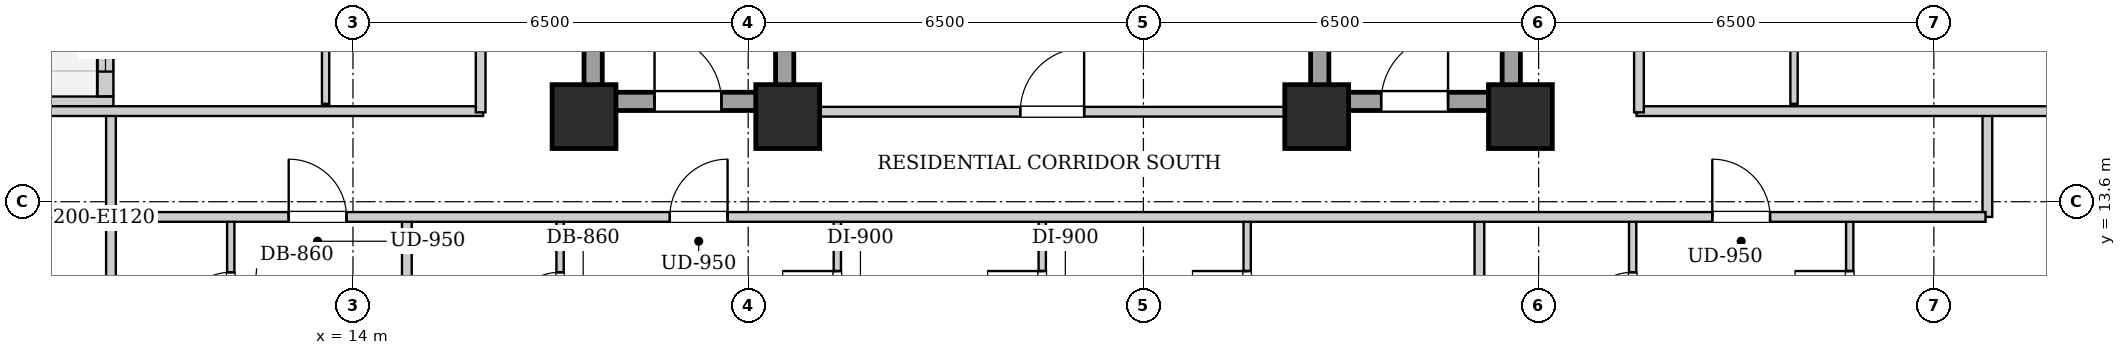
"""IFC4 building model, lengths in metres.
Left out: names, types, materials, properties, quantities, classifications, styles, units other than length and angle.
Written with IfcOpenShell. Run it as: python <this file> out.ifc"""

import sys

from ifc_helpers import new_model, si_unit, direction, frame, frame_2d, origin, origin_2d, place, context, subcontext, project, spatial, rectangle, extrude, element, fill, save


model = new_model("IFC4")
c1 = context("Model", 3, precision=1e-05, world=origin(), true_north=direction((0.0, 1.0)))
c2 = subcontext(c1, "Body", "Model", "MODEL_VIEW")
j1 = project(units=[si_unit("LENGTHUNIT", "METRE"), si_unit("PLANEANGLEUNIT", "RADIAN")], contexts=[c1])
p1 = place(None, origin())
s1 = spatial("IfcSite", under=j1, at=p1, CompositionType="ELEMENT")
p2 = place(p1, origin())
s2 = spatial("IfcBuilding", under=s1, at=p2, CompositionType="ELEMENT")
p3 = place(p2, frame((0.0, 0.0, 78.3)))
s3 = spatial("IfcBuildingStorey", under=s2, at=p3, CompositionType="ELEMENT", Elevation=78.3)
for number, where, z_axis, x_axis in (
    (1, (17.8, 15.0, 0.0), (0.0, 0.0, 1.0), (1.0, 0.0, 0.0)),
    (2, (21.15, 15.0, 0.0), (0.0, 0.0, 1.0), (1.0, 0.0, 0.0)),
    (3, (29.85, 15.0, 0.0), (0.0, 0.0, 1.0), (1.0, 0.0, 0.0)),
    (4, (33.2, 15.0, 0.0), (0.0, 0.0, 1.0), (1.0, 0.0, 0.0)),
):
    element("IfcColumn", number, at=place(p3, frame(where, z_axis=z_axis, x_axis=x_axis)), inside=s3, PredefinedType="COLUMN", context=c2, shape_type="SweptSolid", body=[
        extrude(rectangle(XDim=1.05, YDim=1.05, at=origin_2d()), origin(), (0.0, 0.0, 1.0), 3.2),
    ])
p4 = place(p3, frame((7.66, 15.2, 0.0), z_axis=(0.0, 0.0, 1.0), x_axis=(1.0, 0.0, 0.0)))
e5 = element("IfcWall", 5, at=p4, inside=s3, PredefinedType="SOLIDWALL", context=c2, shape_type="SweptSolid", body=[
    extrude(rectangle(XDim=2.4, YDim=0.26, at=frame_2d((1.2, 0.0))), origin(), (0.0, 0.0, 1.0), 2.94),
])
p5 = place(p3, frame((9.93, 15.334, 0.0), z_axis=(0.0, 0.0, 1.0), x_axis=(0.0, 1.0, 0.0)))
e6 = element("IfcWall", 6, at=p5, inside=s3, PredefinedType="SOLIDWALL", context=c2, shape_type="SweptSolid", body=[
    extrude(rectangle(XDim=3.932, YDim=0.26, at=frame_2d((1.966, 0.0))), origin(), (0.0, 0.0, 1.0), 2.94),
])
p6 = place(p5, frame((1.416, 0.0, 0.0)))
e7 = element("IfcOpeningElement", 7, at=p6, cuts=e6, PredefinedType="OPENING", context=c2, shape_type="SweptSolid", body=[
    extrude(rectangle(XDim=1.1, YDim=2.0, at=frame_2d((0.55, 1.0))), frame((0.0, 0.14, 0.0), z_axis=(0.0, -1.0, 0.0), x_axis=(1.0, 0.0, 0.0)), (0.0, 0.0, 1.0), 0.28),
])
p7 = place(p5, frame((0.406, 0.0, 0.55)))
e8 = element("IfcOpeningElement", 8, at=p7, cuts=e6, PredefinedType="OPENING", context=c2, shape_type="SweptSolid", body=[
    extrude(rectangle(XDim=0.85, YDim=1.2, at=frame_2d((0.425, 0.6))), frame((0.0, 0.14, 0.0), z_axis=(0.0, -1.0, 0.0), x_axis=(1.0, 0.0, 0.0)), (0.0, 0.0, 1.0), 0.28),
])
for number, where, z_axis, x_axis in (
    (9, (17.95, 15.1, 0.0), (0.0, 0.0, 1.0), (0.0, 1.0, 0.0)),
    (10, (21.1, 15.1, 0.0), (0.0, 0.0, 1.0), (0.0, 1.0, 0.0)),
):
    element("IfcWall", number, at=place(p3, frame(where, z_axis=z_axis, x_axis=x_axis)), inside=s3, PredefinedType="SHEAR", context=c2, shape_type="SweptSolid", body=[
        extrude(rectangle(XDim=9.0, YDim=0.3, at=frame_2d((4.5, 0.0))), origin(), (0.0, 0.0, 1.0), 2.94),
    ])
p8 = place(p3, frame((18.1, 15.25, 0.0), z_axis=(0.0, 0.0, 1.0), x_axis=(1.0, 0.0, 0.0)))
e11 = element("IfcWall", 11, at=p8, inside=s3, PredefinedType="SHEAR", context=c2, shape_type="SweptSolid", body=[
    extrude(rectangle(XDim=2.85, YDim=0.3, at=frame_2d((1.425, 0.0))), origin(), (0.0, 0.0, 1.0), 2.94),
])
p9 = place(p8, frame((0.86, 0.0, 0.0)))
e12 = element("IfcOpeningElement", 12, at=p9, cuts=e11, PredefinedType="OPENING", context=c2, shape_type="SweptSolid", body=[
    extrude(rectangle(XDim=1.1, YDim=2.05, at=frame_2d((0.55, 1.025))), frame((0.0, 0.16, 0.0), z_axis=(0.0, -1.0, 0.0), x_axis=(1.0, 0.0, 0.0)), (0.0, 0.0, 1.0), 0.32),
])
for number, where, z_axis, x_axis in (
    (13, (29.9, 15.1, 0.0), (0.0, 0.0, 1.0), (0.0, 1.0, 0.0)),
    (14, (33.05, 15.1, 0.0), (0.0, 0.0, 1.0), (0.0, 1.0, 0.0)),
):
    element("IfcWall", number, at=place(p3, frame(where, z_axis=z_axis, x_axis=x_axis)), inside=s3, PredefinedType="SHEAR", context=c2, shape_type="SweptSolid", body=[
        extrude(rectangle(XDim=9.0, YDim=0.3, at=frame_2d((4.5, 0.0))), origin(), (0.0, 0.0, 1.0), 2.94),
    ])
p10 = place(p3, frame((30.05, 15.25, 0.0), z_axis=(0.0, 0.0, 1.0), x_axis=(1.0, 0.0, 0.0)))
e15 = element("IfcWall", 15, at=p10, inside=s3, PredefinedType="SHEAR", context=c2, shape_type="SweptSolid", body=[
    extrude(rectangle(XDim=2.85, YDim=0.3, at=frame_2d((1.425, 0.0))), origin(), (0.0, 0.0, 1.0), 2.94),
])
p11 = place(p10, frame((0.86, 0.0, 0.0)))
e16 = element("IfcOpeningElement", 16, at=p11, cuts=e15, PredefinedType="OPENING", context=c2, shape_type="SweptSolid", body=[
    extrude(rectangle(XDim=1.1, YDim=2.05, at=frame_2d((0.55, 1.025))), frame((0.0, 0.16, 0.0), z_axis=(0.0, -1.0, 0.0), x_axis=(1.0, 0.0, 0.0)), (0.0, 0.0, 1.0), 0.32),
])
p12 = place(p3, frame((21.25, 15.08, 0.0), z_axis=(0.0, 0.0, 1.0), x_axis=(1.0, 0.0, 0.0)))
e17 = element("IfcWall", 17, at=p12, inside=s3, PredefinedType="PARTITIONING", context=c2, shape_type="SweptSolid", body=[
    extrude(rectangle(XDim=8.5, YDim=0.16, at=frame_2d((4.25, 0.0))), origin(), (0.0, 0.0, 1.0), 2.309),
])
p13 = place(p12, frame((3.725, 0.0, 0.0)))
e18 = element("IfcOpeningElement", 18, at=p13, cuts=e17, PredefinedType="OPENING", context=c2, shape_type="SweptSolid", body=[
    extrude(rectangle(XDim=1.05, YDim=2.05, at=frame_2d((0.525, 1.025))), frame((0.0, 0.09, 0.0), z_axis=(0.0, -1.0, 0.0), x_axis=(1.0, 0.0, 0.0)), (0.0, 0.0, 1.0), 0.18),
])
for number, where, z_axis, x_axis in (
    (19, (10.02, 13.35, 0.0), (0.0, 0.0, 1.0), (0.0, 1.0, 0.0)),
    (20, (40.88, 13.35, 0.0), (0.0, 0.0, 1.0), (0.0, 1.0, 0.0)),
):
    element("IfcWall", number, at=place(p3, frame(where, z_axis=z_axis, x_axis=x_axis)), inside=s3, PredefinedType="PARTITIONING", context=c2, shape_type="SweptSolid", body=[
        extrude(rectangle(XDim=1.74, YDim=0.16, at=frame_2d((0.87, 0.0))), origin(), (0.0, 0.0, 1.0), 2.94),
    ])
p14 = place(p3, frame((7.78, 15.09, 0.0), z_axis=(0.0, 0.0, 1.0), x_axis=(1.0, 0.0, 0.0)))
e21 = element("IfcWall", 21, at=p14, inside=s3, PredefinedType="PARTITIONING", context=c2, shape_type="SweptSolid", body=[
    extrude(rectangle(XDim=8.36, YDim=0.16, at=frame_2d((4.18, 0.0))), origin(), (0.0, 0.0, 1.0), 2.309),
])
p15 = place(p3, frame((35.11, 15.09, 0.0), z_axis=(0.0, 0.0, 1.0), x_axis=(1.0, 0.0, 0.0)))
e22 = element("IfcWall", 22, at=p15, inside=s3, PredefinedType="PARTITIONING", context=c2, shape_type="SweptSolid", body=[
    extrude(rectangle(XDim=8.01, YDim=0.16, at=frame_2d((4.005, 0.0))), origin(), (0.0, 0.0, 1.0), 2.309),
])
p16 = place(p3, frame((10.02, 10.65, 0.0), z_axis=(0.0, 0.0, 1.0), x_axis=(0.0, 1.0, 0.0)))
e23 = element("IfcWall", 23, at=p16, inside=s3, PredefinedType="PARTITIONING", context=c2, shape_type="SweptSolid", body=[
    extrude(rectangle(XDim=2.66, YDim=0.16, at=frame_2d((1.33, 0.0))), origin(), (0.0, 0.0, 1.0), 2.94),
])
p17 = place(p3, frame((11.99, 10.71, 0.0), z_axis=(0.0, 0.0, 1.0), x_axis=(0.0, 1.0, 0.0)))
e24 = element("IfcWall", 24, at=p17, inside=s3, PredefinedType="PARTITIONING", context=c2, shape_type="SweptSolid", body=[
    extrude(rectangle(XDim=2.6, YDim=0.12, at=frame_2d((1.3, 0.0))), origin(), (0.0, 0.0, 1.0), 2.94),
])
p18 = place(p17, frame((0.87, 0.0, 0.0)))
e25 = element("IfcOpeningElement", 25, at=p18, cuts=e24, PredefinedType="OPENING", context=c2, shape_type="SweptSolid", body=[
    extrude(rectangle(XDim=0.86, YDim=2.05, at=frame_2d((0.43, 1.025))), frame((0.0, 0.07, 0.0), z_axis=(0.0, -1.0, 0.0), x_axis=(1.0, 0.0, 0.0)), (0.0, 0.0, 1.0), 0.14),
])
p19 = place(p3, frame((14.886, 2.26, 0.0), z_axis=(0.0, 0.0, 1.0), x_axis=(0.0, 1.0, 0.0)))
e26 = element("IfcWall", 26, at=p19, inside=s3, PredefinedType="PARTITIONING", context=c2, shape_type="SweptSolid", body=[
    extrude(rectangle(XDim=11.05, YDim=0.16, at=frame_2d((5.525, 0.0))), origin(), (0.0, 0.0, 1.0), 2.94),
])
p20 = place(p3, frame((17.406, 10.71, 0.0), z_axis=(0.0, 0.0, 1.0), x_axis=(0.0, 1.0, 0.0)))
e27 = element("IfcWall", 27, at=p20, inside=s3, PredefinedType="PARTITIONING", context=c2, shape_type="SweptSolid", body=[
    extrude(rectangle(XDim=2.6, YDim=0.12, at=frame_2d((1.3, 0.0))), origin(), (0.0, 0.0, 1.0), 2.94),
])
p21 = place(p20, frame((0.87, 0.0, 0.0)))
e28 = element("IfcOpeningElement", 28, at=p21, cuts=e27, PredefinedType="OPENING", context=c2, shape_type="SweptSolid", body=[
    extrude(rectangle(XDim=0.86, YDim=2.05, at=frame_2d((0.43, 1.025))), frame((0.0, 0.07, 0.0), z_axis=(0.0, -1.0, 0.0), x_axis=(1.0, 0.0, 0.0)), (0.0, 0.0, 1.0), 0.14),
])
p22 = place(p3, frame((21.966, 10.71, 0.0), z_axis=(0.0, 0.0, 1.0), x_axis=(0.0, 1.0, 0.0)))
e29 = element("IfcWall", 29, at=p22, inside=s3, PredefinedType="PARTITIONING", context=c2, shape_type="SweptSolid", body=[
    extrude(rectangle(XDim=2.6, YDim=0.12, at=frame_2d((1.3, 0.0))), origin(), (0.0, 0.0, 1.0), 2.94),
])
p23 = place(p22, frame((0.85, 0.0, 0.0)))
e30 = element("IfcOpeningElement", 30, at=p23, cuts=e29, PredefinedType="OPENING", context=c2, shape_type="SweptSolid", body=[
    extrude(rectangle(XDim=0.9, YDim=2.05, at=frame_2d((0.45, 1.025))), frame((0.0, 0.07, 0.0), z_axis=(0.0, -1.0, 0.0), x_axis=(1.0, 0.0, 0.0)), (0.0, 0.0, 1.0), 0.14),
])
p24 = place(p3, frame((25.336, 10.71, 0.0), z_axis=(0.0, 0.0, 1.0), x_axis=(0.0, 1.0, 0.0)))
e31 = element("IfcWall", 31, at=p24, inside=s3, PredefinedType="PARTITIONING", context=c2, shape_type="SweptSolid", body=[
    extrude(rectangle(XDim=2.6, YDim=0.12, at=frame_2d((1.3, 0.0))), origin(), (0.0, 0.0, 1.0), 2.94),
])
p25 = place(p24, frame((0.85, 0.0, 0.0)))
e32 = element("IfcOpeningElement", 32, at=p25, cuts=e31, PredefinedType="OPENING", context=c2, shape_type="SweptSolid", body=[
    extrude(rectangle(XDim=0.9, YDim=2.05, at=frame_2d((0.45, 1.025))), frame((0.0, 0.07, 0.0), z_axis=(0.0, -1.0, 0.0), x_axis=(1.0, 0.0, 0.0)), (0.0, 0.0, 1.0), 0.14),
])
p26 = place(p3, frame((28.706, 10.71, 0.0), z_axis=(0.0, 0.0, 1.0), x_axis=(0.0, 1.0, 0.0)))
e33 = element("IfcWall", 33, at=p26, inside=s3, PredefinedType="PARTITIONING", context=c2, shape_type="SweptSolid", body=[
    extrude(rectangle(XDim=2.6, YDim=0.12, at=frame_2d((1.3, 0.0))), origin(), (0.0, 0.0, 1.0), 2.94),
])
p27 = place(p26, frame((0.85, 0.0, 0.0)))
e34 = element("IfcOpeningElement", 34, at=p27, cuts=e33, PredefinedType="OPENING", context=c2, shape_type="SweptSolid", body=[
    extrude(rectangle(XDim=0.9, YDim=2.05, at=frame_2d((0.45, 1.025))), frame((0.0, 0.07, 0.0), z_axis=(0.0, -1.0, 0.0), x_axis=(1.0, 0.0, 0.0)), (0.0, 0.0, 1.0), 0.14),
])
p28 = place(p3, frame((32.526, 0.28, 0.0), z_axis=(0.0, 0.0, 1.0), x_axis=(0.0, 1.0, 0.0)))
e35 = element("IfcWall", 35, at=p28, inside=s3, PredefinedType="PARTITIONING", context=c2, shape_type="SweptSolid", body=[
    extrude(rectangle(XDim=13.03, YDim=0.16, at=frame_2d((6.515, 0.0))), origin(), (0.0, 0.0, 1.0), 2.94),
])
p29 = place(p3, frame((35.046, 10.71, 0.0), z_axis=(0.0, 0.0, 1.0), x_axis=(0.0, 1.0, 0.0)))
e36 = element("IfcWall", 36, at=p29, inside=s3, PredefinedType="PARTITIONING", context=c2, shape_type="SweptSolid", body=[
    extrude(rectangle(XDim=2.6, YDim=0.12, at=frame_2d((1.3, 0.0))), origin(), (0.0, 0.0, 1.0), 2.94),
])
p30 = place(p29, frame((0.87, 0.0, 0.0)))
e37 = element("IfcOpeningElement", 37, at=p30, cuts=e36, PredefinedType="OPENING", context=c2, shape_type="SweptSolid", body=[
    extrude(rectangle(XDim=0.86, YDim=2.05, at=frame_2d((0.43, 1.025))), frame((0.0, 0.07, 0.0), z_axis=(0.0, -1.0, 0.0), x_axis=(1.0, 0.0, 0.0)), (0.0, 0.0, 1.0), 0.14),
])
p31 = place(p3, frame((38.616, 10.71, 0.0), z_axis=(0.0, 0.0, 1.0), x_axis=(0.0, 1.0, 0.0)))
e38 = element("IfcWall", 38, at=p31, inside=s3, PredefinedType="PARTITIONING", context=c2, shape_type="SweptSolid", body=[
    extrude(rectangle(XDim=2.6, YDim=0.12, at=frame_2d((1.3, 0.0))), origin(), (0.0, 0.0, 1.0), 2.94),
])
p32 = place(p31, frame((0.85, 0.0, 0.0)))
e39 = element("IfcOpeningElement", 39, at=p32, cuts=e38, PredefinedType="OPENING", context=c2, shape_type="SweptSolid", body=[
    extrude(rectangle(XDim=0.9, YDim=2.05, at=frame_2d((0.45, 1.025))), frame((0.0, 0.07, 0.0), z_axis=(0.0, -1.0, 0.0), x_axis=(1.0, 0.0, 0.0)), (0.0, 0.0, 1.0), 0.14),
])
p33 = place(p3, frame((13.55, 15.21, 0.0), z_axis=(0.0, 0.0, 1.0), x_axis=(0.0, 1.0, 0.0)))
e40 = element("IfcWall", 40, at=p33, inside=s3, PredefinedType="PARTITIONING", context=c2, shape_type="SweptSolid", body=[
    extrude(rectangle(XDim=2.3, YDim=0.12, at=frame_2d((1.15, 0.0))), origin(), (0.0, 0.0, 1.0), 2.94),
])
p34 = place(p3, frame((37.7, 15.21, 0.0), z_axis=(0.0, 0.0, 1.0), x_axis=(0.0, 1.0, 0.0)))
e41 = element("IfcWall", 41, at=p34, inside=s3, PredefinedType="PARTITIONING", context=c2, shape_type="SweptSolid", body=[
    extrude(rectangle(XDim=1.85, YDim=0.12, at=frame_2d((0.925, 0.0))), origin(), (0.0, 0.0, 1.0), 2.94),
])
p35 = place(p3, frame((10.05, 13.35, 0.0), z_axis=(0.0, 0.0, 1.0), x_axis=(1.0, 0.0, 0.0)))
e42 = element("IfcWall", 42, at=p35, inside=s3, PredefinedType="PARTITIONING", context=c2, shape_type="SweptSolid", body=[
    extrude(rectangle(XDim=30.8, YDim=0.16, at=frame_2d((15.4, 0.0))), origin(), (0.0, 0.0, 1.0), 2.94),
])
p36 = place(p35, frame((2.893, 0.0, 0.0)))
e43 = element("IfcOpeningElement", 43, at=p36, cuts=e42, PredefinedType="OPENING", context=c2, shape_type="SweptSolid", body=[
    extrude(rectangle(XDim=0.95, YDim=2.1, at=frame_2d((0.475, 1.05))), frame((0.0, 0.09, 0.0), z_axis=(0.0, -1.0, 0.0), x_axis=(1.0, 0.0, 0.0)), (0.0, 0.0, 1.0), 0.18),
])
p37 = place(p35, frame((9.161, 0.0, 0.0)))
e44 = element("IfcOpeningElement", 44, at=p37, cuts=e42, PredefinedType="OPENING", context=c2, shape_type="SweptSolid", body=[
    extrude(rectangle(XDim=0.95, YDim=2.1, at=frame_2d((0.475, 1.05))), frame((0.0, 0.09, 0.0), z_axis=(0.0, -1.0, 0.0), x_axis=(1.0, 0.0, 0.0)), (0.0, 0.0, 1.0), 0.18),
])
p38 = place(p35, frame((26.306, 0.0, 0.0)))
e45 = element("IfcOpeningElement", 45, at=p38, cuts=e42, PredefinedType="OPENING", context=c2, shape_type="SweptSolid", body=[
    extrude(rectangle(XDim=0.95, YDim=2.1, at=frame_2d((0.475, 1.05))), frame((0.0, 0.09, 0.0), z_axis=(0.0, -1.0, 0.0), x_axis=(1.0, 0.0, 0.0)), (0.0, 0.0, 1.0), 0.18),
])
p39 = place(p3, frame((16.1, 15.07, 0.0), z_axis=(0.0, 0.0, 1.0), x_axis=(0.0, 1.0, 0.0)))
e46 = element("IfcWall", 46, at=p39, inside=s3, PredefinedType="PARTITIONING", context=c2, shape_type="SweptSolid", body=[
    extrude(rectangle(XDim=13.93, YDim=0.16, at=frame_2d((6.965, 0.0))), origin(), (0.0, 0.0, 1.0), 2.94),
])
p40 = place(p39, frame((4.385, 0.0, 0.0)))
e47 = element("IfcOpeningElement", 47, at=p40, cuts=e46, PredefinedType="OPENING", context=c2, shape_type="SweptSolid", body=[
    extrude(rectangle(XDim=0.95, YDim=2.1, at=frame_2d((0.475, 1.05))), frame((0.0, 0.09, 0.0), z_axis=(0.0, -1.0, 0.0), x_axis=(1.0, 0.0, 0.0)), (0.0, 0.0, 1.0), 0.18),
])
p41 = place(p3, frame((35.15, 15.07, 0.0), z_axis=(0.0, 0.0, 1.0), x_axis=(0.0, 1.0, 0.0)))
e48 = element("IfcWall", 48, at=p41, inside=s3, PredefinedType="PARTITIONING", context=c2, shape_type="SweptSolid", body=[
    extrude(rectangle(XDim=13.93, YDim=0.16, at=frame_2d((6.965, 0.0))), origin(), (0.0, 0.0, 1.0), 2.94),
])
p42 = place(p41, frame((3.608, 0.0, 0.0)))
e49 = element("IfcOpeningElement", 49, at=p42, cuts=e48, PredefinedType="OPENING", context=c2, shape_type="SweptSolid", body=[
    extrude(rectangle(XDim=0.95, YDim=2.1, at=frame_2d((0.475, 1.05))), frame((0.0, 0.09, 0.0), z_axis=(0.0, -1.0, 0.0), x_axis=(1.0, 0.0, 0.0)), (0.0, 0.0, 1.0), 0.18),
])
p43 = place(p41, frame((10.649, 0.0, 0.0)))
e50 = element("IfcOpeningElement", 50, at=p43, cuts=e48, PredefinedType="OPENING", context=c2, shape_type="SweptSolid", body=[
    extrude(rectangle(XDim=0.95, YDim=2.1, at=frame_2d((0.475, 1.05))), frame((0.0, 0.09, 0.0), z_axis=(0.0, -1.0, 0.0), x_axis=(1.0, 0.0, 0.0)), (0.0, 0.0, 1.0), 0.18),
])
p44 = place(p9, origin())
e51 = element("IfcDoor", 51, at=p44, inside=s3, OperationType="SINGLE_SWING_LEFT", PredefinedType="DOOR", context=c2, shape_type="SweptSolid", body=[
    extrude(rectangle(XDim=1.1, YDim=2.05, at=frame_2d((0.55, 1.025))), frame((0.0, 0.025, 0.0), z_axis=(0.0, -1.0, 0.0), x_axis=(1.0, 0.0, 0.0)), (0.0, 0.0, 1.0), 0.05),
])
fill(e12, e51)
p45 = place(p11, origin())
e52 = element("IfcDoor", 52, at=p45, inside=s3, OperationType="SINGLE_SWING_RIGHT", PredefinedType="DOOR", context=c2, shape_type="SweptSolid", body=[
    extrude(rectangle(XDim=1.1, YDim=2.05, at=frame_2d((0.55, 1.025))), frame((0.0, 0.025, 0.0), z_axis=(0.0, -1.0, 0.0), x_axis=(1.0, 0.0, 0.0)), (0.0, 0.0, 1.0), 0.05),
])
fill(e16, e52)
p46 = place(p13, origin())
e53 = element("IfcDoor", 53, at=p46, inside=s3, OperationType="SINGLE_SWING_RIGHT", PredefinedType="DOOR", context=c2, shape_type="SweptSolid", body=[
    extrude(rectangle(XDim=1.05, YDim=2.05, at=frame_2d((0.525, 1.025))), frame((0.0, 0.025, 0.0), z_axis=(0.0, -1.0, 0.0), x_axis=(1.0, 0.0, 0.0)), (0.0, 0.0, 1.0), 0.05),
])
fill(e18, e53)
p47 = place(p18, origin())
e54 = element("IfcDoor", 54, at=p47, inside=s3, OperationType="SINGLE_SWING_LEFT", PredefinedType="DOOR", context=c2, shape_type="SweptSolid", body=[
    extrude(rectangle(XDim=0.86, YDim=2.05, at=frame_2d((0.43, 1.025))), frame((0.0, 0.025, 0.0), z_axis=(0.0, -1.0, 0.0), x_axis=(1.0, 0.0, 0.0)), (0.0, 0.0, 1.0), 0.05),
])
fill(e25, e54)
p48 = place(p21, origin())
e55 = element("IfcDoor", 55, at=p48, inside=s3, OperationType="SINGLE_SWING_LEFT", PredefinedType="DOOR", context=c2, shape_type="SweptSolid", body=[
    extrude(rectangle(XDim=0.86, YDim=2.05, at=frame_2d((0.43, 1.025))), frame((0.0, 0.025, 0.0), z_axis=(0.0, -1.0, 0.0), x_axis=(1.0, 0.0, 0.0)), (0.0, 0.0, 1.0), 0.05),
])
fill(e28, e55)
p49 = place(p23, origin())
e56 = element("IfcDoor", 56, at=p49, inside=s3, OperationType="SINGLE_SWING_RIGHT", PredefinedType="DOOR", context=c2, shape_type="SweptSolid", body=[
    extrude(rectangle(XDim=0.9, YDim=2.05, at=frame_2d((0.45, 1.025))), frame((0.0, 0.025, 0.0), z_axis=(0.0, -1.0, 0.0), x_axis=(1.0, 0.0, 0.0)), (0.0, 0.0, 1.0), 0.05),
])
fill(e30, e56)
p50 = place(p25, origin())
e57 = element("IfcDoor", 57, at=p50, inside=s3, OperationType="SINGLE_SWING_RIGHT", PredefinedType="DOOR", context=c2, shape_type="SweptSolid", body=[
    extrude(rectangle(XDim=0.9, YDim=2.05, at=frame_2d((0.45, 1.025))), frame((0.0, 0.025, 0.0), z_axis=(0.0, -1.0, 0.0), x_axis=(1.0, 0.0, 0.0)), (0.0, 0.0, 1.0), 0.05),
])
fill(e32, e57)
p51 = place(p27, origin())
e58 = element("IfcDoor", 58, at=p51, inside=s3, OperationType="SINGLE_SWING_RIGHT", PredefinedType="DOOR", context=c2, shape_type="SweptSolid", body=[
    extrude(rectangle(XDim=0.9, YDim=2.05, at=frame_2d((0.45, 1.025))), frame((0.0, 0.025, 0.0), z_axis=(0.0, -1.0, 0.0), x_axis=(1.0, 0.0, 0.0)), (0.0, 0.0, 1.0), 0.05),
])
fill(e34, e58)
p52 = place(p30, origin())
e59 = element("IfcDoor", 59, at=p52, inside=s3, OperationType="SINGLE_SWING_LEFT", PredefinedType="DOOR", context=c2, shape_type="SweptSolid", body=[
    extrude(rectangle(XDim=0.86, YDim=2.05, at=frame_2d((0.43, 1.025))), frame((0.0, 0.025, 0.0), z_axis=(0.0, -1.0, 0.0), x_axis=(1.0, 0.0, 0.0)), (0.0, 0.0, 1.0), 0.05),
])
fill(e37, e59)
p53 = place(p32, origin())
e60 = element("IfcDoor", 60, at=p53, inside=s3, OperationType="SINGLE_SWING_RIGHT", PredefinedType="DOOR", context=c2, shape_type="SweptSolid", body=[
    extrude(rectangle(XDim=0.9, YDim=2.05, at=frame_2d((0.45, 1.025))), frame((0.0, 0.025, 0.0), z_axis=(0.0, -1.0, 0.0), x_axis=(1.0, 0.0, 0.0)), (0.0, 0.0, 1.0), 0.05),
])
fill(e39, e60)
p54 = place(p36, origin())
e61 = element("IfcDoor", 61, at=p54, inside=s3, OperationType="SINGLE_SWING_LEFT", PredefinedType="DOOR", context=c2, shape_type="SweptSolid", body=[
    extrude(rectangle(XDim=0.95, YDim=2.1, at=frame_2d((0.475, 1.05))), frame((0.0, 0.025, 0.0), z_axis=(0.0, -1.0, 0.0), x_axis=(1.0, 0.0, 0.0)), (0.0, 0.0, 1.0), 0.05),
])
fill(e43, e61)
p55 = place(p37, origin())
e62 = element("IfcDoor", 62, at=p55, inside=s3, OperationType="SINGLE_SWING_RIGHT", PredefinedType="DOOR", context=c2, shape_type="SweptSolid", body=[
    extrude(rectangle(XDim=0.95, YDim=2.1, at=frame_2d((0.475, 1.05))), frame((0.0, 0.025, 0.0), z_axis=(0.0, -1.0, 0.0), x_axis=(1.0, 0.0, 0.0)), (0.0, 0.0, 1.0), 0.05),
])
fill(e44, e62)
p56 = place(p38, origin())
e63 = element("IfcDoor", 63, at=p56, inside=s3, OperationType="SINGLE_SWING_LEFT", PredefinedType="DOOR", context=c2, shape_type="SweptSolid", body=[
    extrude(rectangle(XDim=0.95, YDim=2.1, at=frame_2d((0.475, 1.05))), frame((0.0, 0.025, 0.0), z_axis=(0.0, -1.0, 0.0), x_axis=(1.0, 0.0, 0.0)), (0.0, 0.0, 1.0), 0.05),
])
fill(e45, e63)
p57 = place(p7, origin())
e64 = element("IfcWindow", 64, at=p57, inside=s3, PartitioningType="SINGLE_PANEL", PredefinedType="WINDOW", context=c2, shape_type="SweptSolid", body=[
    extrude(rectangle(XDim=0.85, YDim=1.2, at=frame_2d((0.425, 0.6))), frame((0.0, 0.03, 0.0), z_axis=(0.0, -1.0, 0.0), x_axis=(1.0, 0.0, 0.0)), (0.0, 0.0, 1.0), 0.06),
])
fill(e8, e64)
save(model, sys.argv[1])
